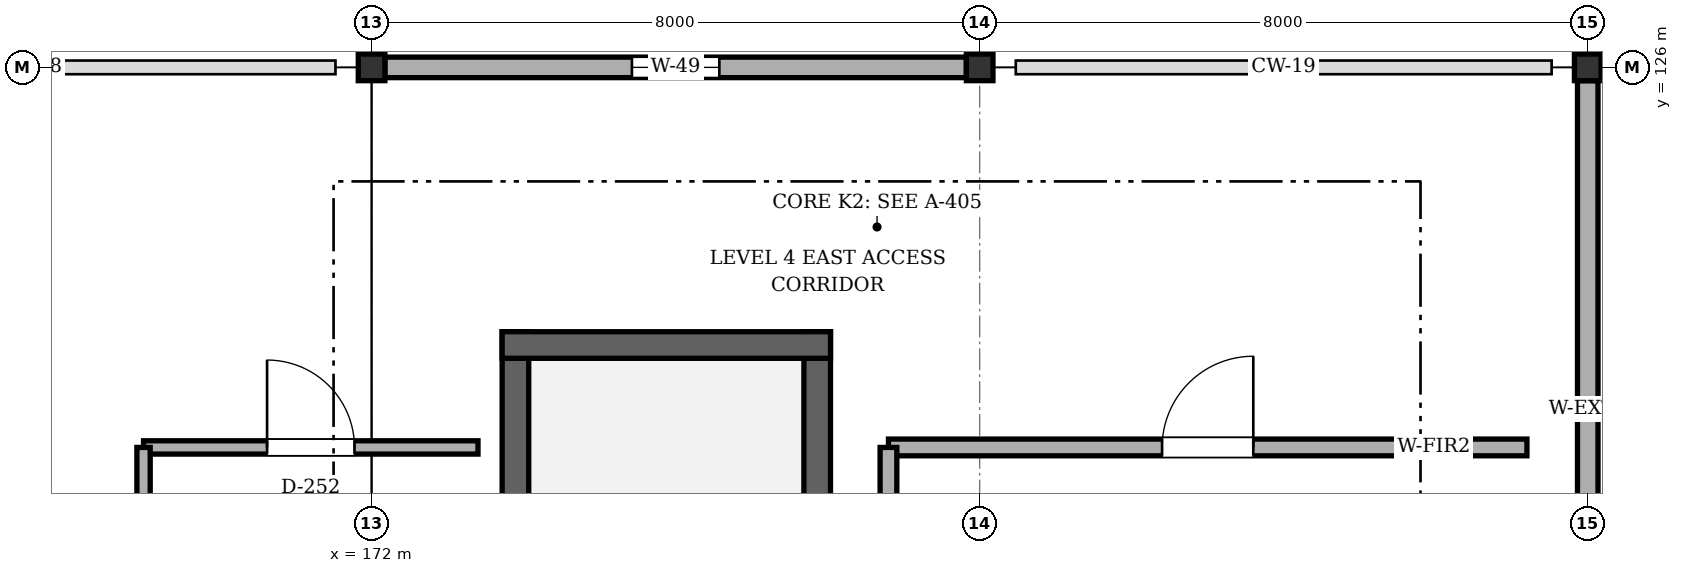
"""IFC4 building model, lengths in metres.
Left out: names, types, materials, properties, quantities, classifications, styles, units other than length and angle.
Written with IfcOpenShell. Run it as: python <this file> out.ifc"""

import sys

from ifc_helpers import new_model, si_unit, direction, frame, frame_2d, origin, origin_2d, place, context, subcontext, project, spatial, rectangle, i_section, extrude, element, fill, save


model = new_model("IFC4")
c1 = context("Model", 3, precision=1e-05, world=origin(), true_north=direction((0.0, 1.0)))
c2 = subcontext(c1, "Body", "Model", "MODEL_VIEW")
j1 = project(units=[si_unit("LENGTHUNIT", "METRE"), si_unit("PLANEANGLEUNIT", "RADIAN")], contexts=[c1])
p1 = place(None, origin())
s1 = spatial("IfcSite", under=j1, at=p1, CompositionType="ELEMENT")
p2 = place(p1, origin())
s2 = spatial("IfcBuilding", under=s1, at=p2, CompositionType="ELEMENT")
p3 = place(p2, frame((0.0, 0.0, 17.6)))
s3 = spatial("IfcBuildingStorey", under=s2, at=p3, CompositionType="ELEMENT", Elevation=17.6)
for number, where, z_axis, x_axis in (
    (1, (172.0, 126.0, 0.0), (0.0, 0.0, 1.0), (1.0, 0.0, 0.0)),
    (2, (180.0, 126.0, 0.0), (0.0, 0.0, 1.0), (1.0, 0.0, 0.0)),
    (3, (188.0, 126.0, 0.0), (0.0, 0.0, 1.0), (1.0, 0.0, 0.0)),
):
    element("IfcColumn", number, at=place(p3, frame(where, z_axis=z_axis, x_axis=x_axis)), inside=s3, PredefinedType="COLUMN", context=c2, shape_type="SweptSolid", body=[
        extrude(i_section(OverallWidth=0.35, OverallDepth=0.35, WebThickness=0.012, FlangeThickness=0.019, FilletRadius=0.02, at=origin_2d()), origin(), (0.0, 0.0, 1.0), 3.2),
    ])
p4 = place(p3, frame((172.175, 126.0, 0.0), z_axis=(0.0, 0.0, 1.0), x_axis=(1.0, 0.0, 0.0)))
e4 = element("IfcWall", 4, at=p4, inside=s3, PredefinedType="SOLIDWALL", context=c2, shape_type="SweptSolid", body=[
    extrude(rectangle(XDim=7.65, YDim=0.27, at=frame_2d((3.825, 0.0))), origin(), (0.0, 0.0, 1.0), 2.495),
])
p5 = place(p4, frame((3.25, 0.0, 0.9)))
e5 = element("IfcOpeningElement", 5, at=p5, cuts=e4, PredefinedType="OPENING", context=c2, shape_type="SweptSolid", body=[
    extrude(rectangle(XDim=1.15, YDim=1.45, at=frame_2d((0.575, 0.725))), frame((0.0, 0.145, 0.0), z_axis=(0.0, -1.0, 0.0), x_axis=(1.0, 0.0, 0.0)), (0.0, 0.0, 1.0), 0.29),
])
p6 = place(p3, frame((188.0, 125.825, 0.0), z_axis=(0.0, 0.0, 1.0), x_axis=(0.0, -1.0, 0.0)))
e6 = element("IfcWall", 6, at=p6, inside=s3, PredefinedType="SOLIDWALL", context=c2, shape_type="SweptSolid", body=[
    extrude(rectangle(XDim=8.65, YDim=0.27, at=frame_2d((4.325, 0.0))), origin(), (0.0, 0.0, 1.0), 2.375),
])
for number, where, z_axis, x_axis in (
    (7, (177.863, 112.025, 0.0), (0.0, 0.0, 1.0), (0.0, 1.0, 0.0)),
    (8, (173.893, 122.522, 0.0), (0.0, 0.0, 1.0), (0.0, -1.0, 0.0)),
):
    element("IfcWall", number, at=place(p3, frame(where, z_axis=z_axis, x_axis=x_axis)), inside=s3, PredefinedType="SHEAR", context=c2, shape_type="SweptSolid", body=[
        extrude(rectangle(XDim=10.498, YDim=0.35, at=frame_2d((5.249, 0.0))), origin(), (0.0, 0.0, 1.0), 2.98),
    ])
p7 = place(p3, frame((178.038, 122.347, 0.0), z_axis=(0.0, 0.0, 1.0), x_axis=(-1.0, 0.0, 0.0)))
e9 = element("IfcWall", 9, at=p7, inside=s3, PredefinedType="SHEAR", context=c2, shape_type="SweptSolid", body=[
    extrude(rectangle(XDim=4.32, YDim=0.35, at=frame_2d((2.16, 0.0))), origin(), (0.0, 0.0, 1.0), 2.98),
])
p8 = place(p3, frame((178.8, 121.0, 0.0), z_axis=(0.0, 0.0, 1.0), x_axis=(1.0, 0.0, 0.0)))
e10 = element("IfcWall", 10, at=p8, inside=s3, PredefinedType="SOLIDWALL", context=c2, shape_type="SweptSolid", body=[
    extrude(rectangle(XDim=8.4, YDim=0.22, at=frame_2d((4.2, 0.0))), origin(), (0.0, 0.0, 1.0), 2.495),
])
p9 = place(p8, frame((3.6, 0.0, 0.0)))
e11 = element("IfcOpeningElement", 11, at=p9, cuts=e10, PredefinedType="OPENING", context=c2, shape_type="SweptSolid", body=[
    extrude(rectangle(XDim=1.2, YDim=2.1, at=frame_2d((0.6, 1.05))), frame((0.0, 0.12, 0.0), z_axis=(0.0, -1.0, 0.0), x_axis=(1.0, 0.0, 0.0)), (0.0, 0.0, 1.0), 0.24),
])
p10 = place(p3, frame((178.8, 108.2, 0.0), z_axis=(0.0, 0.0, 1.0), x_axis=(0.0, 1.0, 0.0)))
e12 = element("IfcWall", 12, at=p10, inside=s3, PredefinedType="SOLIDWALL", context=c2, shape_type="SweptSolid", body=[
    extrude(rectangle(XDim=12.8, YDim=0.22, at=frame_2d((6.4, 0.0))), origin(), (0.0, 0.0, 1.0), 2.955),
])
p11 = place(p3, frame((169.0, 121.0, 0.0), z_axis=(0.0, 0.0, 1.0), x_axis=(1.0, 0.0, 0.0)))
e13 = element("IfcWall", 13, at=p11, inside=s3, PredefinedType="PARTITIONING", context=c2, shape_type="SweptSolid", body=[
    extrude(rectangle(XDim=4.4, YDim=0.175, at=frame_2d((2.2, 0.0))), origin(), (0.0, 0.0, 1.0), 2.565),
])
p12 = place(p11, frame((1.625, 0.0, 0.0)))
e14 = element("IfcOpeningElement", 14, at=p12, cuts=e13, PredefinedType="OPENING", context=c2, shape_type="SweptSolid", body=[
    extrude(rectangle(XDim=1.15, YDim=2.1, at=frame_2d((0.575, 1.05))), frame((0.0, 0.097, 0.0), z_axis=(0.0, -1.0, 0.0), x_axis=(1.0, 0.0, 0.0)), (0.0, 0.0, 1.0), 0.195),
])
p13 = place(p3, frame((169.0, 108.4, 0.0), z_axis=(0.0, 0.0, 1.0), x_axis=(0.0, 1.0, 0.0)))
e15 = element("IfcWall", 15, at=p13, inside=s3, PredefinedType="PARTITIONING", context=c2, shape_type="SweptSolid", body=[
    extrude(rectangle(XDim=12.6, YDim=0.175, at=frame_2d((6.3, 0.0))), origin(), (0.0, 0.0, 1.0), 2.515),
])
p14 = place(p5, origin())
e16 = element("IfcWindow", 16, at=p14, inside=s3, PartitioningType="SINGLE_PANEL", PredefinedType="WINDOW", context=c2, shape_type="SweptSolid", body=[
    extrude(rectangle(XDim=1.15, YDim=1.45, at=frame_2d((0.575, 0.725))), frame((0.0, 0.03, 0.0), z_axis=(0.0, -1.0, 0.0), x_axis=(1.0, 0.0, 0.0)), (0.0, 0.0, 1.0), 0.06),
])
fill(e5, e16)
p15 = place(p9, origin())
e17 = element("IfcDoor", 17, at=p15, inside=s3, OperationType="SINGLE_SWING_RIGHT", PredefinedType="DOOR", context=c2, shape_type="SweptSolid", body=[
    extrude(rectangle(XDim=1.2, YDim=2.1, at=frame_2d((0.6, 1.05))), frame((0.0, 0.025, 0.0), z_axis=(0.0, -1.0, 0.0), x_axis=(1.0, 0.0, 0.0)), (0.0, 0.0, 1.0), 0.05),
])
fill(e11, e17)
p16 = place(p12, origin())
e18 = element("IfcDoor", 18, at=p16, inside=s3, OperationType="SINGLE_SWING_LEFT", PredefinedType="DOOR", context=c2, shape_type="SweptSolid", body=[
    extrude(rectangle(XDim=1.15, YDim=2.1, at=frame_2d((0.575, 1.05))), frame((0.0, 0.025, 0.0), z_axis=(0.0, -1.0, 0.0), x_axis=(1.0, 0.0, 0.0)), (0.0, 0.0, 1.0), 0.05),
])
fill(e14, e18)
save(model, sys.argv[1])
